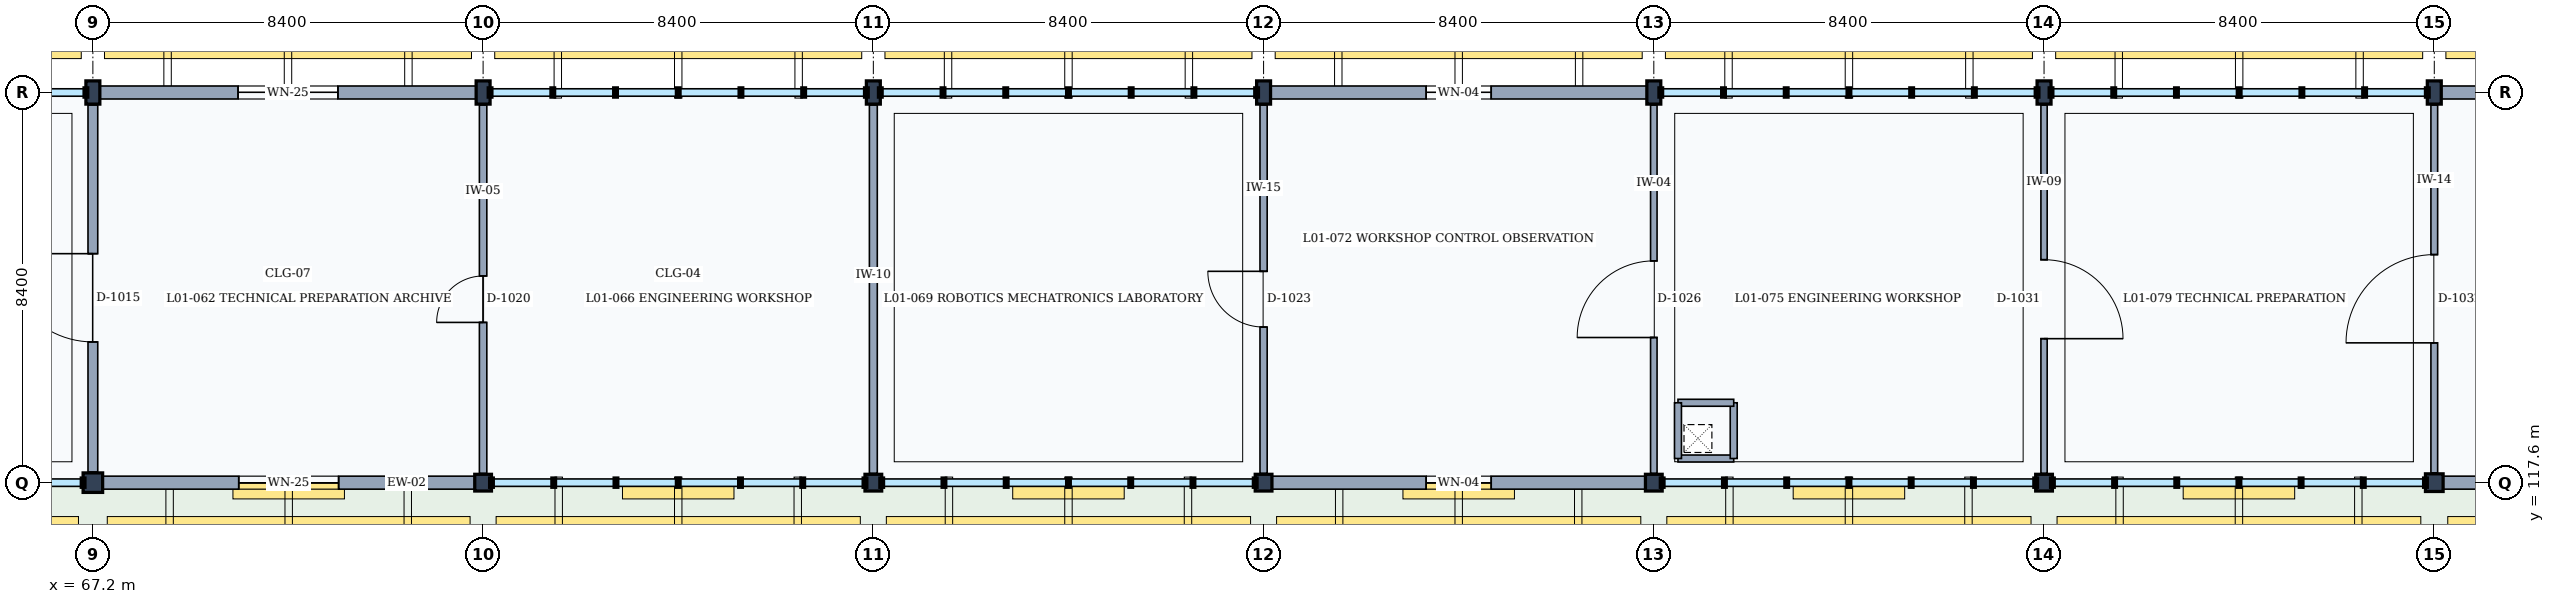
"""IFC4 building model, lengths in metres.
Left out: names, types, materials, properties, quantities, classifications, styles, units other than length and angle.
Written with IfcOpenShell. Run it as: python <this file> out.ifc"""

import sys

from ifc_helpers import new_model, si_unit, direction, frame, frame_2d, origin, origin_2d, place, context, subcontext, project, spatial, rectangle, i_section, extrude, element, fill, save


model = new_model("IFC4")
c1 = context("Model", 3, precision=1e-05, world=origin(), true_north=direction((0.0, 1.0)))
c2 = subcontext(c1, "Body", "Model", "MODEL_VIEW")
j1 = project(units=[si_unit("LENGTHUNIT", "METRE"), si_unit("PLANEANGLEUNIT", "RADIAN")], contexts=[c1])
p1 = place(None, origin())
s1 = spatial("IfcSite", under=j1, at=p1, CompositionType="ELEMENT")
p2 = place(p1, origin())
s2 = spatial("IfcBuilding", under=s1, at=p2, CompositionType="ELEMENT")
p3 = place(p2, frame((0.0, 0.0, 4.8)))
s3 = spatial("IfcBuildingStorey", under=s2, at=p3, CompositionType="ELEMENT", Elevation=4.8)
p4 = place(p3, frame((67.2, 117.6, 0.0), z_axis=(0.0, 0.0, 1.0), x_axis=(1.0, 0.0, 0.0)))
e1 = element("IfcColumn", 1, at=p4, inside=s3, PredefinedType="COLUMN", context=c2, shape_type="SweptSolid", body=[
    extrude(rectangle(XDim=0.42, YDim=0.42, at=origin_2d()), origin(), (0.0, 0.0, 1.0), 4.8),
])
p5 = place(p3, frame((67.2, 126.0, 0.0), z_axis=(0.0, 0.0, 1.0), x_axis=(1.0, 0.0, 0.0)))
e2 = element("IfcColumn", 2, at=p5, inside=s3, PredefinedType="COLUMN", context=c2, shape_type="SweptSolid", body=[
    extrude(i_section(OverallWidth=0.3, OverallDepth=0.5, WebThickness=0.014, FlangeThickness=0.028, FilletRadius=0.027, at=origin_2d()), origin(), (0.0, 0.0, 1.0), 4.8),
])
p6 = place(p3, frame((75.6, 117.6, 0.0), z_axis=(0.0, 0.0, 1.0), x_axis=(1.0, 0.0, 0.0)))
e3 = element("IfcColumn", 3, at=p6, inside=s3, PredefinedType="COLUMN", context=c2, shape_type="SweptSolid", body=[
    extrude(rectangle(XDim=0.36, YDim=0.36, at=origin_2d()), origin(), (0.0, 0.0, 1.0), 4.8),
])
p7 = place(p3, frame((75.6, 126.0, 0.0), z_axis=(0.0, 0.0, 1.0), x_axis=(1.0, 0.0, 0.0)))
e4 = element("IfcColumn", 4, at=p7, inside=s3, PredefinedType="COLUMN", context=c2, shape_type="SweptSolid", body=[
    extrude(i_section(OverallWidth=0.3, OverallDepth=0.5, WebThickness=0.014, FlangeThickness=0.028, FilletRadius=0.027, at=origin_2d()), origin(), (0.0, 0.0, 1.0), 4.8),
])
p8 = place(p3, frame((84.0, 117.6, 0.0), z_axis=(0.0, 0.0, 1.0), x_axis=(1.0, 0.0, 0.0)))
e5 = element("IfcColumn", 5, at=p8, inside=s3, PredefinedType="COLUMN", context=c2, shape_type="SweptSolid", body=[
    extrude(rectangle(XDim=0.36, YDim=0.36, at=origin_2d()), origin(), (0.0, 0.0, 1.0), 4.8),
])
p9 = place(p3, frame((84.0, 126.0, 0.0), z_axis=(0.0, 0.0, 1.0), x_axis=(1.0, 0.0, 0.0)))
e6 = element("IfcColumn", 6, at=p9, inside=s3, PredefinedType="COLUMN", context=c2, shape_type="SweptSolid", body=[
    extrude(i_section(OverallWidth=0.3, OverallDepth=0.5, WebThickness=0.014, FlangeThickness=0.028, FilletRadius=0.027, at=origin_2d()), origin(), (0.0, 0.0, 1.0), 4.8),
])
p10 = place(p3, frame((92.4, 117.6, 0.0), z_axis=(0.0, 0.0, 1.0), x_axis=(1.0, 0.0, 0.0)))
e7 = element("IfcColumn", 7, at=p10, inside=s3, PredefinedType="COLUMN", context=c2, shape_type="SweptSolid", body=[
    extrude(rectangle(XDim=0.36, YDim=0.36, at=origin_2d()), origin(), (0.0, 0.0, 1.0), 4.8),
])
p11 = place(p3, frame((92.4, 126.0, 0.0), z_axis=(0.0, 0.0, 1.0), x_axis=(1.0, 0.0, 0.0)))
e8 = element("IfcColumn", 8, at=p11, inside=s3, PredefinedType="COLUMN", context=c2, shape_type="SweptSolid", body=[
    extrude(i_section(OverallWidth=0.3, OverallDepth=0.5, WebThickness=0.014, FlangeThickness=0.028, FilletRadius=0.027, at=origin_2d()), origin(), (0.0, 0.0, 1.0), 4.8),
])
p12 = place(p3, frame((100.8, 117.6, 0.0), z_axis=(0.0, 0.0, 1.0), x_axis=(1.0, 0.0, 0.0)))
e9 = element("IfcColumn", 9, at=p12, inside=s3, PredefinedType="COLUMN", context=c2, shape_type="SweptSolid", body=[
    extrude(rectangle(XDim=0.36, YDim=0.36, at=origin_2d()), origin(), (0.0, 0.0, 1.0), 4.8),
])
p13 = place(p3, frame((100.8, 126.0, 0.0), z_axis=(0.0, 0.0, 1.0), x_axis=(1.0, 0.0, 0.0)))
e10 = element("IfcColumn", 10, at=p13, inside=s3, PredefinedType="COLUMN", context=c2, shape_type="SweptSolid", body=[
    extrude(i_section(OverallWidth=0.3, OverallDepth=0.5, WebThickness=0.014, FlangeThickness=0.028, FilletRadius=0.027, at=origin_2d()), origin(), (0.0, 0.0, 1.0), 4.8),
])
p14 = place(p3, frame((109.2, 117.6, 0.0), z_axis=(0.0, 0.0, 1.0), x_axis=(1.0, 0.0, 0.0)))
e11 = element("IfcColumn", 11, at=p14, inside=s3, PredefinedType="COLUMN", context=c2, shape_type="SweptSolid", body=[
    extrude(rectangle(XDim=0.36, YDim=0.36, at=origin_2d()), origin(), (0.0, 0.0, 1.0), 4.8),
])
p15 = place(p3, frame((109.2, 126.0, 0.0), z_axis=(0.0, 0.0, 1.0), x_axis=(1.0, 0.0, 0.0)))
e12 = element("IfcColumn", 12, at=p15, inside=s3, PredefinedType="COLUMN", context=c2, shape_type="SweptSolid", body=[
    extrude(i_section(OverallWidth=0.3, OverallDepth=0.5, WebThickness=0.014, FlangeThickness=0.028, FilletRadius=0.027, at=origin_2d()), origin(), (0.0, 0.0, 1.0), 4.8),
])
p16 = place(p3, frame((117.6, 117.6, 0.0), z_axis=(0.0, 0.0, 1.0), x_axis=(1.0, 0.0, 0.0)))
e13 = element("IfcColumn", 13, at=p16, inside=s3, PredefinedType="COLUMN", context=c2, shape_type="SweptSolid", body=[
    extrude(rectangle(XDim=0.38, YDim=0.38, at=origin_2d()), origin(), (0.0, 0.0, 1.0), 4.8),
])
p17 = place(p3, frame((117.6, 126.0, 0.0), z_axis=(0.0, 0.0, 1.0), x_axis=(1.0, 0.0, 0.0)))
e14 = element("IfcColumn", 14, at=p17, inside=s3, PredefinedType="COLUMN", context=c2, shape_type="SweptSolid", body=[
    extrude(i_section(OverallWidth=0.3, OverallDepth=0.5, WebThickness=0.014, FlangeThickness=0.028, FilletRadius=0.027, at=origin_2d()), origin(), (0.0, 0.0, 1.0), 4.8),
])
p18 = place(p3, frame((75.42, 117.6, 0.0), z_axis=(0.0, 0.0, 1.0), x_axis=(-1.0, 0.0, 0.0)))
e15 = element("IfcWall", 15, at=p18, inside=s3, PredefinedType="SOLIDWALL", context=c2, shape_type="SweptSolid", body=[
    extrude(rectangle(XDim=8.01, YDim=0.28, at=frame_2d((4.005, 0.0))), origin(), (0.0, 0.0, 1.0), 3.35),
])
p19 = place(p18, frame((2.93, 0.0, 0.9)))
e16 = element("IfcOpeningElement", 16, at=p19, cuts=e15, PredefinedType="OPENING", context=c2, shape_type="SweptSolid", body=[
    extrude(rectangle(XDim=2.15, YDim=1.85, at=frame_2d((1.075, 0.925))), frame((0.0, 0.15, 0.0), z_axis=(0.0, -1.0, 0.0), x_axis=(1.0, 0.0, 0.0)), (0.0, 0.0, 1.0), 0.3),
])
p20 = place(p3, frame((67.35, 126.0, 0.0), z_axis=(0.0, 0.0, 1.0), x_axis=(1.0, 0.0, 0.0)))
e17 = element("IfcWall", 17, at=p20, inside=s3, PredefinedType="SOLIDWALL", context=c2, shape_type="SweptSolid", body=[
    extrude(rectangle(XDim=8.1, YDim=0.28, at=frame_2d((4.05, 0.0))), origin(), (0.0, 0.0, 1.0), 3.96),
])
p21 = place(p20, frame((2.975, 0.0, 0.9)))
e18 = element("IfcOpeningElement", 18, at=p21, cuts=e17, PredefinedType="OPENING", context=c2, shape_type="SweptSolid", body=[
    extrude(rectangle(XDim=2.15, YDim=1.85, at=frame_2d((1.075, 0.925))), frame((0.0, 0.15, 0.0), z_axis=(0.0, -1.0, 0.0), x_axis=(1.0, 0.0, 0.0)), (0.0, 0.0, 1.0), 0.3),
])
p22 = place(p3, frame((100.62, 117.6, 0.0), z_axis=(0.0, 0.0, 1.0), x_axis=(-1.0, 0.0, 0.0)))
e19 = element("IfcWall", 19, at=p22, inside=s3, PredefinedType="SOLIDWALL", context=c2, shape_type="SweptSolid", body=[
    extrude(rectangle(XDim=8.04, YDim=0.28, at=frame_2d((4.02, 0.0))), origin(), (0.0, 0.0, 1.0), 3.35),
])
p23 = place(p22, frame((3.32, 0.0, 0.9)))
e20 = element("IfcOpeningElement", 20, at=p23, cuts=e19, PredefinedType="OPENING", context=c2, shape_type="SweptSolid", body=[
    extrude(rectangle(XDim=1.4, YDim=2.1, at=frame_2d((0.7, 1.05))), frame((0.0, 0.15, 0.0), z_axis=(0.0, -1.0, 0.0), x_axis=(1.0, 0.0, 0.0)), (0.0, 0.0, 1.0), 0.3),
])
p24 = place(p3, frame((92.55, 126.0, 0.0), z_axis=(0.0, 0.0, 1.0), x_axis=(1.0, 0.0, 0.0)))
e21 = element("IfcWall", 21, at=p24, inside=s3, PredefinedType="SOLIDWALL", context=c2, shape_type="SweptSolid", body=[
    extrude(rectangle(XDim=8.1, YDim=0.28, at=frame_2d((4.05, 0.0))), origin(), (0.0, 0.0, 1.0), 3.96),
])
p25 = place(p24, frame((3.35, 0.0, 0.9)))
e22 = element("IfcOpeningElement", 22, at=p25, cuts=e21, PredefinedType="OPENING", context=c2, shape_type="SweptSolid", body=[
    extrude(rectangle(XDim=1.4, YDim=2.1, at=frame_2d((0.7, 1.05))), frame((0.0, 0.15, 0.0), z_axis=(0.0, -1.0, 0.0), x_axis=(1.0, 0.0, 0.0)), (0.0, 0.0, 1.0), 0.3),
])
p26 = place(p3, frame((125.79, 117.6, 0.0), z_axis=(0.0, 0.0, 1.0), x_axis=(-1.0, 0.0, 0.0)))
e23 = element("IfcWall", 23, at=p26, inside=s3, PredefinedType="SOLIDWALL", context=c2, shape_type="SweptSolid", body=[
    extrude(rectangle(XDim=8.0, YDim=0.28, at=frame_2d((4.0, 0.0))), origin(), (0.0, 0.0, 1.0), 3.35),
])
p27 = place(p26, frame((2.85, 0.0, 0.9)))
e24 = element("IfcOpeningElement", 24, at=p27, cuts=e23, PredefinedType="OPENING", context=c2, shape_type="SweptSolid", body=[
    extrude(rectangle(XDim=2.3, YDim=1.5, at=frame_2d((1.15, 0.75))), frame((0.0, 0.15, 0.0), z_axis=(0.0, -1.0, 0.0), x_axis=(1.0, 0.0, 0.0)), (0.0, 0.0, 1.0), 0.3),
])
p28 = place(p3, frame((117.75, 126.0, 0.0), z_axis=(0.0, 0.0, 1.0), x_axis=(1.0, 0.0, 0.0)))
e25 = element("IfcWall", 25, at=p28, inside=s3, PredefinedType="SOLIDWALL", context=c2, shape_type="SweptSolid", body=[
    extrude(rectangle(XDim=8.1, YDim=0.28, at=frame_2d((4.05, 0.0))), origin(), (0.0, 0.0, 1.0), 3.96),
])
p29 = place(p28, frame((2.9, 0.0, 0.9)))
e26 = element("IfcOpeningElement", 26, at=p29, cuts=e25, PredefinedType="OPENING", context=c2, shape_type="SweptSolid", body=[
    extrude(rectangle(XDim=2.3, YDim=1.5, at=frame_2d((1.15, 0.75))), frame((0.0, 0.15, 0.0), z_axis=(0.0, -1.0, 0.0), x_axis=(1.0, 0.0, 0.0)), (0.0, 0.0, 1.0), 0.3),
])
for number, where, z_axis, x_axis in (
    (27, (101.32, 118.12, 0.0), (0.0, 0.0, 1.0), (1.0, 0.0, 0.0)),
    (28, (102.52, 118.12, 0.0), (0.0, 0.0, 1.0), (0.0, 1.0, 0.0)),
    (29, (102.52, 119.32, 0.0), (0.0, 0.0, 1.0), (-1.0, 0.0, 0.0)),
    (30, (101.32, 119.32, 0.0), (0.0, 0.0, 1.0), (0.0, -1.0, 0.0)),
):
    element("IfcWall", number, at=place(p3, frame(where, z_axis=z_axis, x_axis=x_axis)), inside=s3, PredefinedType="PARTITIONING", context=c2, shape_type="SweptSolid", body=[
        extrude(rectangle(XDim=1.2, YDim=0.15, at=frame_2d((0.6, 0.0))), origin(), (0.0, 0.0, 1.0), 4.53),
    ])
p30 = place(p3, frame((67.2, 117.83, 0.0), z_axis=(0.0, 0.0, 1.0), x_axis=(0.0, 1.0, 0.0)))
e31 = element("IfcWall", 31, at=p30, inside=s3, PredefinedType="PARTITIONING", context=c2, shape_type="SweptSolid", body=[
    extrude(rectangle(XDim=7.9, YDim=0.21, at=frame_2d((3.95, 0.0))), origin(), (0.0, 0.0, 1.0), 3.92),
])
p31 = place(p30, frame((2.8, 0.0, 0.0)))
e32 = element("IfcOpeningElement", 32, at=p31, cuts=e31, PredefinedType="OPENING", context=c2, shape_type="SweptSolid", body=[
    extrude(rectangle(XDim=1.9, YDim=2.4, at=frame_2d((0.95, 1.2))), frame((0.0, 0.115, 0.0), z_axis=(0.0, -1.0, 0.0), x_axis=(1.0, 0.0, 0.0)), (0.0, 0.0, 1.0), 0.23),
])
p32 = place(p3, frame((75.6, 117.8, 0.0), z_axis=(0.0, 0.0, 1.0), x_axis=(0.0, 1.0, 0.0)))
e33 = element("IfcWall", 33, at=p32, inside=s3, PredefinedType="PARTITIONING", context=c2, shape_type="SweptSolid", body=[
    extrude(rectangle(XDim=7.93, YDim=0.16, at=frame_2d((3.965, 0.0))), origin(), (0.0, 0.0, 1.0), 3.92),
])
p33 = place(p32, frame((3.25, 0.0, 0.0)))
e34 = element("IfcOpeningElement", 34, at=p33, cuts=e33, PredefinedType="OPENING", context=c2, shape_type="SweptSolid", body=[
    extrude(rectangle(XDim=1.0, YDim=2.15, at=frame_2d((0.5, 1.075))), frame((0.0, 0.09, 0.0), z_axis=(0.0, -1.0, 0.0), x_axis=(1.0, 0.0, 0.0)), (0.0, 0.0, 1.0), 0.18),
])
p34 = place(p3, frame((84.0, 117.8, 0.0), z_axis=(0.0, 0.0, 1.0), x_axis=(0.0, 1.0, 0.0)))
e35 = element("IfcWall", 35, at=p34, inside=s3, PredefinedType="PARTITIONING", context=c2, shape_type="SweptSolid", body=[
    extrude(rectangle(XDim=7.93, YDim=0.17, at=frame_2d((3.965, 0.0))), origin(), (0.0, 0.0, 1.0), 3.92),
])
p35 = place(p3, frame((92.4, 117.8, 0.0), z_axis=(0.0, 0.0, 1.0), x_axis=(0.0, 1.0, 0.0)))
e36 = element("IfcWall", 36, at=p35, inside=s3, PredefinedType="PARTITIONING", context=c2, shape_type="SweptSolid", body=[
    extrude(rectangle(XDim=7.93, YDim=0.155, at=frame_2d((3.965, 0.0))), origin(), (0.0, 0.0, 1.0), 3.92),
])
p36 = place(p35, frame((3.15, 0.0, 0.0)))
e37 = element("IfcOpeningElement", 37, at=p36, cuts=e36, PredefinedType="OPENING", context=c2, shape_type="SweptSolid", body=[
    extrude(rectangle(XDim=1.2, YDim=2.2, at=frame_2d((0.6, 1.1))), frame((0.0, 0.087, 0.0), z_axis=(0.0, -1.0, 0.0), x_axis=(1.0, 0.0, 0.0)), (0.0, 0.0, 1.0), 0.175),
])
p37 = place(p3, frame((100.8, 117.8, 0.0), z_axis=(0.0, 0.0, 1.0), x_axis=(0.0, 1.0, 0.0)))
e38 = element("IfcWall", 38, at=p37, inside=s3, PredefinedType="PARTITIONING", context=c2, shape_type="SweptSolid", body=[
    extrude(rectangle(XDim=7.93, YDim=0.14, at=frame_2d((3.965, 0.0))), origin(), (0.0, 0.0, 1.0), 3.92),
])
p38 = place(p37, frame((2.925, 0.0, 0.0)))
e39 = element("IfcOpeningElement", 39, at=p38, cuts=e38, PredefinedType="OPENING", context=c2, shape_type="SweptSolid", body=[
    extrude(rectangle(XDim=1.65, YDim=2.25, at=frame_2d((0.825, 1.125))), frame((0.0, 0.08, 0.0), z_axis=(0.0, -1.0, 0.0), x_axis=(1.0, 0.0, 0.0)), (0.0, 0.0, 1.0), 0.16),
])
p39 = place(p3, frame((109.2, 117.8, 0.0), z_axis=(0.0, 0.0, 1.0), x_axis=(0.0, 1.0, 0.0)))
e40 = element("IfcWall", 40, at=p39, inside=s3, PredefinedType="PARTITIONING", context=c2, shape_type="SweptSolid", body=[
    extrude(rectangle(XDim=7.93, YDim=0.135, at=frame_2d((3.965, 0.0))), origin(), (0.0, 0.0, 1.0), 3.92),
])
p40 = place(p39, frame((2.9, 0.0, 0.0)))
e41 = element("IfcOpeningElement", 41, at=p40, cuts=e40, PredefinedType="OPENING", context=c2, shape_type="SweptSolid", body=[
    extrude(rectangle(XDim=1.7, YDim=2.3, at=frame_2d((0.85, 1.15))), frame((0.0, 0.077, 0.0), z_axis=(0.0, -1.0, 0.0), x_axis=(1.0, 0.0, 0.0)), (0.0, 0.0, 1.0), 0.155),
])
p41 = place(p3, frame((117.6, 117.81, 0.0), z_axis=(0.0, 0.0, 1.0), x_axis=(0.0, 1.0, 0.0)))
e42 = element("IfcWall", 42, at=p41, inside=s3, PredefinedType="PARTITIONING", context=c2, shape_type="SweptSolid", body=[
    extrude(rectangle(XDim=7.92, YDim=0.145, at=frame_2d((3.96, 0.0))), origin(), (0.0, 0.0, 1.0), 3.92),
])
p42 = place(p41, frame((2.8, 0.0, 0.0)))
e43 = element("IfcOpeningElement", 43, at=p42, cuts=e42, PredefinedType="OPENING", context=c2, shape_type="SweptSolid", body=[
    extrude(rectangle(XDim=1.9, YDim=2.4, at=frame_2d((0.95, 1.2))), frame((0.0, 0.083, 0.0), z_axis=(0.0, -1.0, 0.0), x_axis=(1.0, 0.0, 0.0)), (0.0, 0.0, 1.0), 0.165),
])
p43 = place(p19, origin())
e44 = element("IfcWindow", 44, at=p43, inside=s3, PartitioningType="SINGLE_PANEL", PredefinedType="WINDOW", context=c2, shape_type="SweptSolid", body=[
    extrude(rectangle(XDim=2.15, YDim=1.85, at=frame_2d((1.075, 0.925))), frame((0.0, 0.03, 0.0), z_axis=(0.0, -1.0, 0.0), x_axis=(1.0, 0.0, 0.0)), (0.0, 0.0, 1.0), 0.06),
])
fill(e16, e44)
p44 = place(p21, origin())
e45 = element("IfcWindow", 45, at=p44, inside=s3, PartitioningType="SINGLE_PANEL", PredefinedType="WINDOW", context=c2, shape_type="SweptSolid", body=[
    extrude(rectangle(XDim=2.15, YDim=1.85, at=frame_2d((1.075, 0.925))), frame((0.0, 0.03, 0.0), z_axis=(0.0, -1.0, 0.0), x_axis=(1.0, 0.0, 0.0)), (0.0, 0.0, 1.0), 0.06),
])
fill(e18, e45)
p45 = place(p23, origin())
e46 = element("IfcWindow", 46, at=p45, inside=s3, PartitioningType="SINGLE_PANEL", PredefinedType="WINDOW", context=c2, shape_type="SweptSolid", body=[
    extrude(rectangle(XDim=1.4, YDim=2.1, at=frame_2d((0.7, 1.05))), frame((0.0, 0.03, 0.0), z_axis=(0.0, -1.0, 0.0), x_axis=(1.0, 0.0, 0.0)), (0.0, 0.0, 1.0), 0.06),
])
fill(e20, e46)
p46 = place(p25, origin())
e47 = element("IfcWindow", 47, at=p46, inside=s3, PartitioningType="SINGLE_PANEL", PredefinedType="WINDOW", context=c2, shape_type="SweptSolid", body=[
    extrude(rectangle(XDim=1.4, YDim=2.1, at=frame_2d((0.7, 1.05))), frame((0.0, 0.03, 0.0), z_axis=(0.0, -1.0, 0.0), x_axis=(1.0, 0.0, 0.0)), (0.0, 0.0, 1.0), 0.06),
])
fill(e22, e47)
p47 = place(p31, origin())
e48 = element("IfcDoor", 48, at=p47, inside=s3, OperationType="SINGLE_SWING_RIGHT", PredefinedType="DOOR", context=c2, shape_type="SweptSolid", body=[
    extrude(rectangle(XDim=1.9, YDim=2.4, at=frame_2d((0.95, 1.2))), frame((0.0, 0.025, 0.0), z_axis=(0.0, -1.0, 0.0), x_axis=(1.0, 0.0, 0.0)), (0.0, 0.0, 1.0), 0.05),
])
fill(e32, e48)
p48 = place(p33, origin())
e49 = element("IfcDoor", 49, at=p48, inside=s3, OperationType="SINGLE_SWING_LEFT", PredefinedType="DOOR", context=c2, shape_type="SweptSolid", body=[
    extrude(rectangle(XDim=1.0, YDim=2.15, at=frame_2d((0.5, 1.075))), frame((0.0, 0.025, 0.0), z_axis=(0.0, -1.0, 0.0), x_axis=(1.0, 0.0, 0.0)), (0.0, 0.0, 1.0), 0.05),
])
fill(e34, e49)
p49 = place(p36, origin())
e50 = element("IfcDoor", 50, at=p49, inside=s3, OperationType="SINGLE_SWING_RIGHT", PredefinedType="DOOR", context=c2, shape_type="SweptSolid", body=[
    extrude(rectangle(XDim=1.2, YDim=2.2, at=frame_2d((0.6, 1.1))), frame((0.0, 0.025, 0.0), z_axis=(0.0, -1.0, 0.0), x_axis=(1.0, 0.0, 0.0)), (0.0, 0.0, 1.0), 0.05),
])
fill(e37, e50)
p50 = place(p38, origin())
e51 = element("IfcDoor", 51, at=p50, inside=s3, OperationType="SINGLE_SWING_LEFT", PredefinedType="DOOR", context=c2, shape_type="SweptSolid", body=[
    extrude(rectangle(XDim=1.65, YDim=2.25, at=frame_2d((0.825, 1.125))), frame((0.0, 0.025, 0.0), z_axis=(0.0, -1.0, 0.0), x_axis=(1.0, 0.0, 0.0)), (0.0, 0.0, 1.0), 0.05),
])
fill(e39, e51)
p51 = place(p40, frame((1.7, 0.0, 0.0), z_axis=(0.0, 0.0, 1.0), x_axis=(-1.0, 0.0, 0.0)))
e52 = element("IfcDoor", 52, at=p51, inside=s3, OperationType="SINGLE_SWING_RIGHT", PredefinedType="DOOR", context=c2, shape_type="SweptSolid", body=[
    extrude(rectangle(XDim=1.7, YDim=2.3, at=frame_2d((0.85, 1.15))), frame((0.0, 0.025, 0.0), z_axis=(0.0, -1.0, 0.0), x_axis=(1.0, 0.0, 0.0)), (0.0, 0.0, 1.0), 0.05),
])
fill(e41, e52)
p52 = place(p42, origin())
e53 = element("IfcDoor", 53, at=p52, inside=s3, OperationType="SINGLE_SWING_LEFT", PredefinedType="DOOR", context=c2, shape_type="SweptSolid", body=[
    extrude(rectangle(XDim=1.9, YDim=2.4, at=frame_2d((0.95, 1.2))), frame((0.0, 0.025, 0.0), z_axis=(0.0, -1.0, 0.0), x_axis=(1.0, 0.0, 0.0)), (0.0, 0.0, 1.0), 0.05),
])
fill(e43, e53)
save(model, sys.argv[1])
